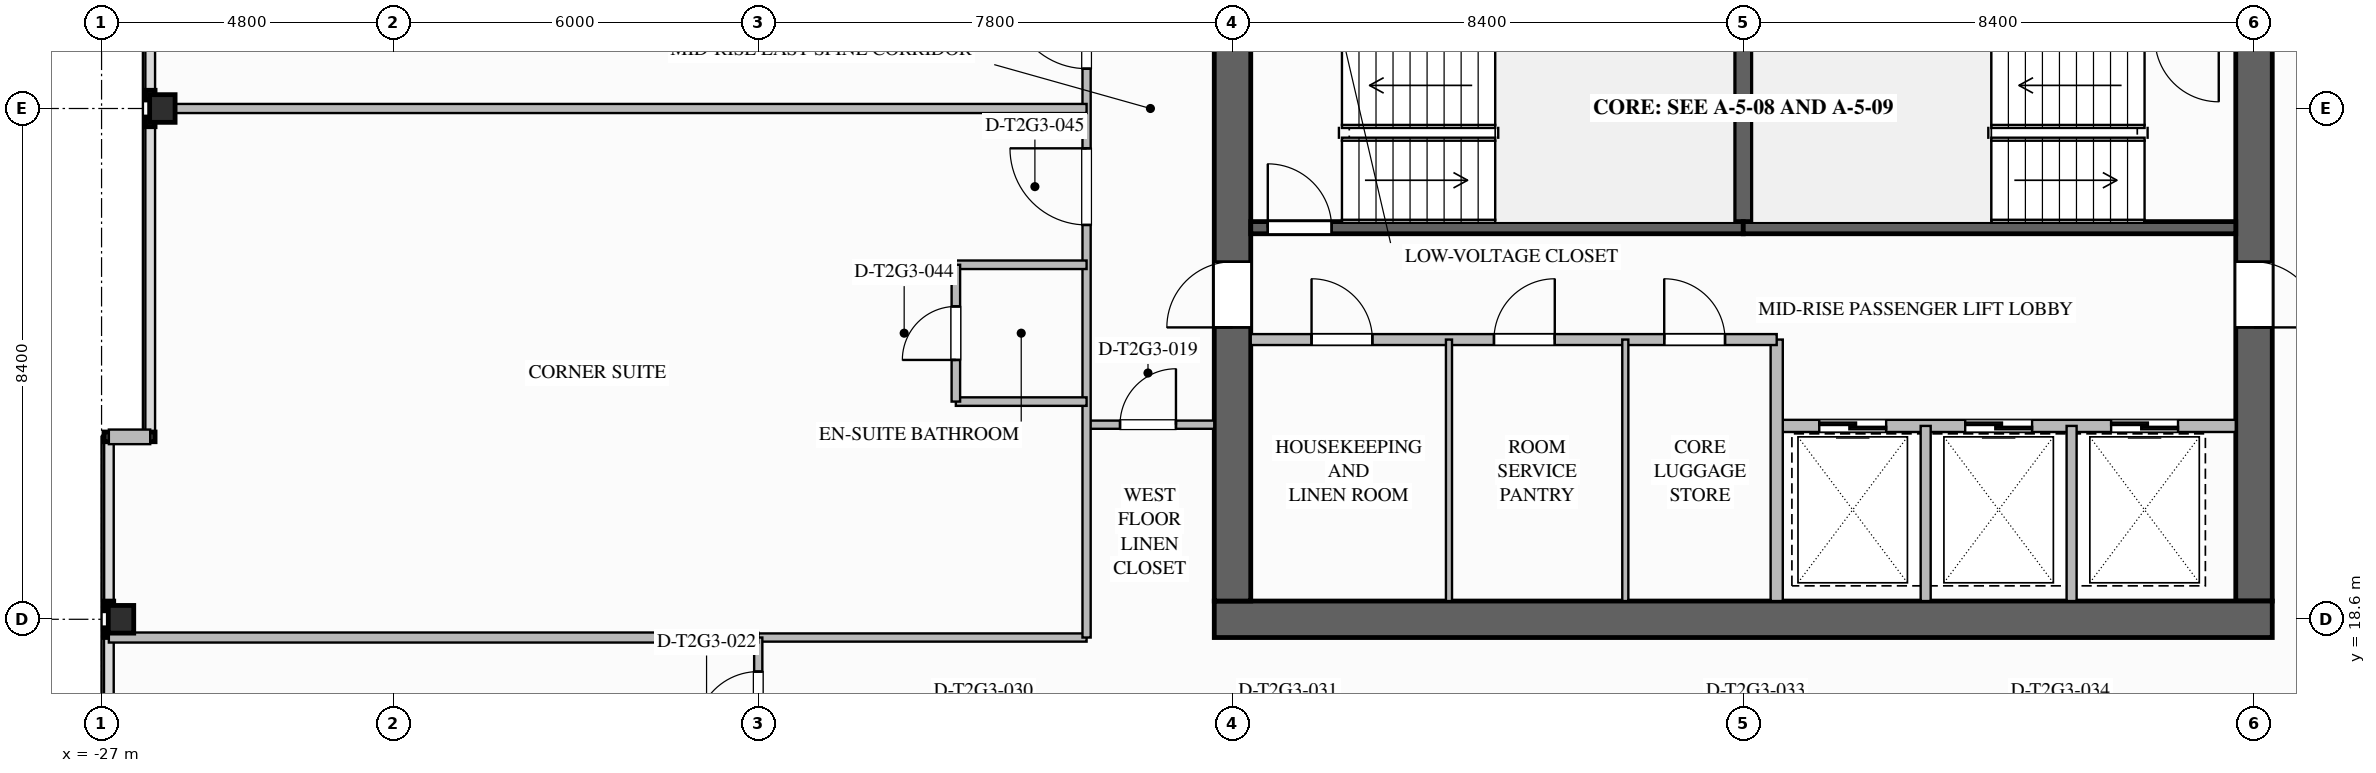
"""IFC4 building model, lengths in metres.
Left out: names, types, materials, properties, quantities, classifications, styles, units other than length and angle.
Written with IfcOpenShell. Run it as: python <this file> out.ifc"""

import sys

from ifc_helpers import new_model, si_unit, direction, frame, frame_2d, origin, origin_2d, place, context, subcontext, project, spatial, rectangle, i_section, extrude, element, fill, save


model = new_model("IFC4")
c1 = context("Model", 3, precision=1e-05, world=origin(), true_north=direction((0.0, 1.0)))
c2 = subcontext(c1, "Body", "Model", "MODEL_VIEW")
j1 = project(units=[si_unit("LENGTHUNIT", "METRE"), si_unit("PLANEANGLEUNIT", "RADIAN")], contexts=[c1])
p1 = place(None, origin())
s1 = spatial("IfcSite", under=j1, at=p1, CompositionType="ELEMENT")
p2 = place(p1, origin())
s2 = spatial("IfcBuilding", under=s1, at=p2, CompositionType="ELEMENT")
p3 = place(p2, frame((0.0, 0.0, 112.8)))
s3 = spatial("IfcBuildingStorey", under=s2, at=p3, CompositionType="ELEMENT", Elevation=112.8)
p4 = place(p3, frame((8.4, 35.1, 0.0), z_axis=(0.0, 0.0, 1.0), x_axis=(0.0, -1.0, 0.0)))
e1 = element("IfcWall", 1, at=p4, inside=s3, PredefinedType="SHEAR", context=c2, shape_type="SweptSolid", body=[
    extrude(rectangle(XDim=16.2, YDim=0.6, at=frame_2d((8.1, 0.0))), origin(), (0.0, 0.0, 1.0), 3.5),
])
p5 = place(p4, frame((3.08, 0.0, 0.0)))
e2 = element("IfcOpeningElement", 2, at=p5, cuts=e1, PredefinedType="OPENING", context=c2, shape_type="SweptSolid", body=[
    extrude(rectangle(XDim=1.12, YDim=2.1, at=frame_2d((0.56, 1.05))), frame((0.0, 0.31, 0.0), z_axis=(0.0, -1.0, 0.0), x_axis=(1.0, 0.0, 0.0)), (0.0, 0.0, 1.0), 0.62),
])
p6 = place(p4, frame((10.62, 0.0, 0.0)))
e3 = element("IfcOpeningElement", 3, at=p6, cuts=e1, PredefinedType="OPENING", context=c2, shape_type="SweptSolid", body=[
    extrude(rectangle(XDim=1.08, YDim=2.04, at=frame_2d((0.54, 1.02))), frame((0.0, 0.31, 0.0), z_axis=(0.0, -1.0, 0.0), x_axis=(1.0, 0.0, 0.0)), (0.0, 0.0, 1.0), 0.62),
])
p7 = place(p3, frame((8.7, 18.6, 0.0), z_axis=(0.0, 0.0, 1.0), x_axis=(-1.0, 0.0, 0.0)))
e4 = element("IfcWall", 4, at=p7, inside=s3, PredefinedType="SHEAR", context=c2, shape_type="SweptSolid", body=[
    extrude(rectangle(XDim=17.4, YDim=0.6, at=frame_2d((8.7, 0.0))), origin(), (0.0, 0.0, 1.0), 3.5),
])
p8 = place(p3, frame((-8.4, 18.9, 0.0), z_axis=(0.0, 0.0, 1.0), x_axis=(0.0, 1.0, 0.0)))
e5 = element("IfcWall", 5, at=p8, inside=s3, PredefinedType="SHEAR", context=c2, shape_type="SweptSolid", body=[
    extrude(rectangle(XDim=16.2, YDim=0.6, at=frame_2d((8.1, 0.0))), origin(), (0.0, 0.0, 1.0), 3.5),
])
p9 = place(p8, frame((4.5, 0.0, 0.0)))
e6 = element("IfcOpeningElement", 6, at=p9, cuts=e5, PredefinedType="OPENING", context=c2, shape_type="SweptSolid", body=[
    extrude(rectangle(XDim=1.08, YDim=2.04, at=frame_2d((0.54, 1.02))), frame((0.0, 0.31, 0.0), z_axis=(0.0, -1.0, 0.0), x_axis=(1.0, 0.0, 0.0)), (0.0, 0.0, 1.0), 0.62),
])
for number, where, z_axis, x_axis in (
    (7, (-26.68, 18.6, 0.0), (0.0, 0.0, 1.0), (1.0, 0.0, 0.0)),
    (8, (-26.0, 27.0, 0.0), (0.0, 0.0, 1.0), (1.0, 0.0, 0.0)),
):
    element("IfcColumn", number, at=place(p3, frame(where, z_axis=z_axis, x_axis=x_axis)), inside=s3, PredefinedType="COLUMN", context=c2, shape_type="SweptSolid", body=[
        extrude(i_section(OverallWidth=0.418, OverallDepth=0.455, WebThickness=0.042, FlangeThickness=0.068, FilletRadius=0.03, at=origin_2d()), origin(), (0.0, 0.0, 1.0), 3.497),
    ])
p10 = place(p3, frame((-26.88, 21.6, 0.0), z_axis=(0.0, 0.0, 1.0), x_axis=(1.0, 0.0, 0.0)))
e9 = element("IfcWall", 9, at=p10, inside=s3, PredefinedType="STANDARD", context=c2, shape_type="SweptSolid", body=[
    extrude(rectangle(XDim=0.68, YDim=0.24, at=frame_2d((0.34, 0.0))), origin(), (0.0, 0.0, 1.0), 3.24),
])
p11 = place(p3, frame((0.0, 25.04, 0.0), z_axis=(0.0, 0.0, 1.0), x_axis=(0.0, 1.0, 0.0)))
e10 = element("IfcWall", 10, at=p11, inside=s3, PredefinedType="SOLIDWALL", context=c2, shape_type="SweptSolid", body=[
    extrude(rectangle(XDim=3.12, YDim=0.3, at=frame_2d((1.56, 0.0))), origin(), (0.0, 0.0, 1.0), 3.24),
])
p12 = place(p3, frame((-8.1, 25.04, 0.0), z_axis=(0.0, 0.0, 1.0), x_axis=(1.0, 0.0, 0.0)))
e11 = element("IfcWall", 11, at=p12, inside=s3, PredefinedType="SOLIDWALL", context=c2, shape_type="SweptSolid", body=[
    extrude(rectangle(XDim=8.1, YDim=0.2, at=frame_2d((4.05, 0.0))), origin(), (0.0, 0.0, 1.0), 3.24),
])
p13 = place(p12, frame((0.28, 0.0, 0.0)))
e12 = element("IfcOpeningElement", 12, at=p13, cuts=e11, PredefinedType="OPENING", context=c2, shape_type="SweptSolid", body=[
    extrude(rectangle(XDim=1.05, YDim=2.1, at=frame_2d((0.525, 1.05))), frame((0.0, 0.11, 0.0), z_axis=(0.0, -1.0, 0.0), x_axis=(1.0, 0.0, 0.0)), (0.0, 0.0, 1.0), 0.22),
])
p14 = place(p3, frame((0.0, 25.04, 0.0), z_axis=(0.0, 0.0, 1.0), x_axis=(1.0, 0.0, 0.0)))
e13 = element("IfcWall", 13, at=p14, inside=s3, PredefinedType="SOLIDWALL", context=c2, shape_type="SweptSolid", body=[
    extrude(rectangle(XDim=8.1, YDim=0.2, at=frame_2d((4.05, 0.0))), origin(), (0.0, 0.0, 1.0), 3.24),
])
p15 = place(p3, frame((8.1, 21.78, 0.0), z_axis=(0.0, 0.0, 1.0), x_axis=(-1.0, 0.0, 0.0)))
e14 = element("IfcWall", 14, at=p15, inside=s3, PredefinedType="SOLIDWALL", context=c2, shape_type="SweptSolid", body=[
    extrude(rectangle(XDim=7.55, YDim=0.2, at=frame_2d((3.775, 0.0))), origin(), (0.0, 0.0, 1.0), 3.24),
])
p16 = place(p15, frame((5.75, 0.0, 0.0)))
e15 = element("IfcOpeningElement", 15, at=p16, cuts=e14, PredefinedType="OPENING", context=c2, shape_type="SweptSolid", body=[
    extrude(rectangle(XDim=1.1, YDim=2.2, at=frame_2d((0.55, 1.1))), frame((0.0, 0.11, 0.0), z_axis=(0.0, -1.0, 0.0), x_axis=(1.0, 0.0, 0.0)), (0.0, 0.0, 1.0), 0.22),
])
p17 = place(p15, frame((3.35, 0.0, 0.0)))
e16 = element("IfcOpeningElement", 16, at=p17, cuts=e14, PredefinedType="OPENING", context=c2, shape_type="SweptSolid", body=[
    extrude(rectangle(XDim=1.1, YDim=2.2, at=frame_2d((0.55, 1.1))), frame((0.0, 0.11, 0.0), z_axis=(0.0, -1.0, 0.0), x_axis=(1.0, 0.0, 0.0)), (0.0, 0.0, 1.0), 0.22),
])
p18 = place(p15, frame((0.95, 0.0, 0.0)))
e17 = element("IfcOpeningElement", 17, at=p18, cuts=e14, PredefinedType="OPENING", context=c2, shape_type="SweptSolid", body=[
    extrude(rectangle(XDim=1.1, YDim=2.2, at=frame_2d((0.55, 1.1))), frame((0.0, 0.11, 0.0), z_axis=(0.0, -1.0, 0.0), x_axis=(1.0, 0.0, 0.0)), (0.0, 0.0, 1.0), 0.22),
])
p19 = place(p3, frame((0.55, 18.9, 0.0), z_axis=(0.0, 0.0, 1.0), x_axis=(0.0, 1.0, 0.0)))
e18 = element("IfcWall", 18, at=p19, inside=s3, PredefinedType="SOLIDWALL", context=c2, shape_type="SweptSolid", body=[
    extrude(rectangle(XDim=4.3, YDim=0.2, at=frame_2d((2.15, 0.0))), origin(), (0.0, 0.0, 1.0), 3.24),
])
for number, where, z_axis, x_axis in (
    (19, (3.0, 18.9, 0.0), (0.0, 0.0, 1.0), (0.0, 1.0, 0.0)),
    (20, (5.4, 18.9, 0.0), (0.0, 0.0, 1.0), (0.0, 1.0, 0.0)),
):
    element("IfcWall", number, at=place(p3, frame(where, z_axis=z_axis, x_axis=x_axis)), inside=s3, PredefinedType="PARTITIONING", context=c2, shape_type="SweptSolid", body=[
        extrude(rectangle(XDim=2.88, YDim=0.165, at=frame_2d((1.44, 0.0))), origin(), (0.0, 0.0, 1.0), 3.24),
    ])
p20 = place(p3, frame((-8.1, 23.2, 0.0), z_axis=(0.0, 0.0, 1.0), x_axis=(1.0, 0.0, 0.0)))
e21 = element("IfcWall", 21, at=p20, inside=s3, PredefinedType="SOLIDWALL", context=c2, shape_type="SweptSolid", body=[
    extrude(rectangle(XDim=8.65, YDim=0.18, at=frame_2d((4.325, 0.0))), origin(), (0.0, 0.0, 1.0), 3.24),
])
p21 = place(p20, frame((1.0, 0.0, 0.0)))
e22 = element("IfcOpeningElement", 22, at=p21, cuts=e21, PredefinedType="OPENING", context=c2, shape_type="SweptSolid", body=[
    extrude(rectangle(XDim=1.0, YDim=2.1, at=frame_2d((0.5, 1.05))), frame((0.0, 0.1, 0.0), z_axis=(0.0, -1.0, 0.0), x_axis=(1.0, 0.0, 0.0)), (0.0, 0.0, 1.0), 0.2),
])
p22 = place(p20, frame((4.0, 0.0, 0.0)))
e23 = element("IfcOpeningElement", 23, at=p22, cuts=e21, PredefinedType="OPENING", context=c2, shape_type="SweptSolid", body=[
    extrude(rectangle(XDim=1.0, YDim=2.1, at=frame_2d((0.5, 1.05))), frame((0.0, 0.1, 0.0), z_axis=(0.0, -1.0, 0.0), x_axis=(1.0, 0.0, 0.0)), (0.0, 0.0, 1.0), 0.2),
])
p23 = place(p20, frame((6.8, 0.0, 0.0)))
e24 = element("IfcOpeningElement", 24, at=p23, cuts=e21, PredefinedType="OPENING", context=c2, shape_type="SweptSolid", body=[
    extrude(rectangle(XDim=1.0, YDim=2.1, at=frame_2d((0.5, 1.05))), frame((0.0, 0.1, 0.0), z_axis=(0.0, -1.0, 0.0), x_axis=(1.0, 0.0, 0.0)), (0.0, 0.0, 1.0), 0.2),
])
for number, where, z_axis, x_axis in (
    (25, (-4.84, 18.9, 0.0), (0.0, 0.0, 1.0), (0.0, 1.0, 0.0)),
    (26, (-1.94, 18.9, 0.0), (0.0, 0.0, 1.0), (0.0, 1.0, 0.0)),
):
    element("IfcWall", number, at=place(p3, frame(where, z_axis=z_axis, x_axis=x_axis)), inside=s3, PredefinedType="PARTITIONING", context=c2, shape_type="SweptSolid", body=[
        extrude(rectangle(XDim=4.3, YDim=0.1, at=frame_2d((2.15, 0.0))), origin(), (0.0, 0.0, 1.0), 3.24),
    ])
p24 = place(p3, frame((-10.8, 21.8, 0.0), z_axis=(0.0, 0.0, 1.0), x_axis=(1.0, 0.0, 0.0)))
e27 = element("IfcWall", 27, at=p24, inside=s3, PredefinedType="PARTITIONING", context=c2, shape_type="SweptSolid", body=[
    extrude(rectangle(XDim=2.1, YDim=0.135, at=frame_2d((1.05, 0.0))), origin(), (0.0, 0.0, 1.0), 3.24),
])
p25 = place(p24, frame((0.55, 0.0, 0.0)))
e28 = element("IfcOpeningElement", 28, at=p25, cuts=e27, PredefinedType="OPENING", context=c2, shape_type="SweptSolid", body=[
    extrude(rectangle(XDim=0.92, YDim=2.1, at=frame_2d((0.46, 1.05))), frame((0.0, 0.077, 0.0), z_axis=(0.0, -1.0, 0.0), x_axis=(1.0, 0.0, 0.0)), (0.0, 0.0, 1.0), 0.155),
])
p26 = place(p3, frame((-16.2, 18.3, 0.0), z_axis=(0.0, 0.0, 1.0), x_axis=(1.0, 0.0, 0.0)))
e29 = element("IfcWall", 29, at=p26, inside=s3, PredefinedType="PARTITIONING", context=c2, shape_type="SweptSolid", body=[
    extrude(rectangle(XDim=5.4, YDim=0.135, at=frame_2d((2.7, 0.0))), origin(), (0.0, 0.0, 1.0), 3.24),
])
p27 = place(p3, frame((-10.8, 18.3, 0.0), z_axis=(0.0, 0.0, 1.0), x_axis=(0.0, 1.0, 0.0)))
e30 = element("IfcWall", 30, at=p27, inside=s3, PredefinedType="PARTITIONING", context=c2, shape_type="SweptSolid", body=[
    extrude(rectangle(XDim=17.4, YDim=0.135, at=frame_2d((8.7, 0.0))), origin(), (0.0, 0.0, 1.0), 3.24),
])
p28 = place(p27, frame((6.785, 0.0, 0.0)))
e31 = element("IfcOpeningElement", 31, at=p28, cuts=e30, PredefinedType="OPENING", context=c2, shape_type="SweptSolid", body=[
    extrude(rectangle(XDim=1.26, YDim=2.2, at=frame_2d((0.63, 1.1))), frame((0.0, 0.077, 0.0), z_axis=(0.0, -1.0, 0.0), x_axis=(1.0, 0.0, 0.0)), (0.0, 0.0, 1.0), 0.155),
])
p29 = place(p27, frame((9.355, 0.0, 0.0)))
e32 = element("IfcOpeningElement", 32, at=p29, cuts=e30, PredefinedType="OPENING", context=c2, shape_type="SweptSolid", body=[
    extrude(rectangle(XDim=1.26, YDim=2.2, at=frame_2d((0.63, 1.1))), frame((0.0, 0.077, 0.0), z_axis=(0.0, -1.0, 0.0), x_axis=(1.0, 0.0, 0.0)), (0.0, 0.0, 1.0), 0.155),
])
p30 = place(p3, frame((-16.2, 16.2, 0.0), z_axis=(0.0, 0.0, 1.0), x_axis=(0.0, 1.0, 0.0)))
e33 = element("IfcWall", 33, at=p30, inside=s3, PredefinedType="PARTITIONING", context=c2, shape_type="SweptSolid", body=[
    extrude(rectangle(XDim=2.1, YDim=0.135, at=frame_2d((1.05, 0.0))), origin(), (0.0, 0.0, 1.0), 2.452),
])
p31 = place(p30, frame((0.52, 0.0, 0.0)))
e34 = element("IfcOpeningElement", 34, at=p31, cuts=e33, PredefinedType="OPENING", context=c2, shape_type="SweptSolid", body=[
    extrude(rectangle(XDim=1.02, YDim=2.15, at=frame_2d((0.51, 1.075))), frame((0.0, 0.077, 0.0), z_axis=(0.0, -1.0, 0.0), x_axis=(1.0, 0.0, 0.0)), (0.0, 0.0, 1.0), 0.155),
])
p32 = place(p3, frame((-26.88, 18.3, 0.0), z_axis=(0.0, 0.0, 1.0), x_axis=(1.0, 0.0, 0.0)))
e35 = element("IfcWall", 35, at=p32, inside=s3, PredefinedType="PARTITIONING", context=c2, shape_type="SweptSolid", body=[
    extrude(rectangle(XDim=10.68, YDim=0.165, at=frame_2d((5.34, 0.0))), origin(), (0.0, 0.0, 1.0), 2.452),
])
p33 = place(p3, frame((-26.2, 27.0, 0.0), z_axis=(0.0, 0.0, 1.0), x_axis=(1.0, 0.0, 0.0)))
e36 = element("IfcWall", 36, at=p33, inside=s3, PredefinedType="PARTITIONING", context=c2, shape_type="SweptSolid", body=[
    extrude(rectangle(XDim=15.4, YDim=0.15, at=frame_2d((7.7, 0.0))), origin(), (0.0, 0.0, 1.0), 2.452),
])
for number, where, z_axis, x_axis in (
    (37, (-10.8, 22.18, 0.0), (0.0, 0.0, 1.0), (-1.0, 0.0, 0.0)),
    (38, (-10.8, 24.43, 0.0), (0.0, 0.0, 1.0), (-1.0, 0.0, 0.0)),
):
    element("IfcWall", number, at=place(p3, frame(where, z_axis=z_axis, x_axis=x_axis)), inside=s3, PredefinedType="PLUMBINGWALL", context=c2, shape_type="SweptSolid", body=[
        extrude(rectangle(XDim=2.15, YDim=0.14, at=frame_2d((1.075, 0.0))), origin(), (0.0, 0.0, 1.0), 3.24),
    ])
p34 = place(p3, frame((-12.95, 22.18, 0.0), z_axis=(0.0, 0.0, 1.0), x_axis=(0.0, 1.0, 0.0)))
e39 = element("IfcWall", 39, at=p34, inside=s3, PredefinedType="PLUMBINGWALL", context=c2, shape_type="SweptSolid", body=[
    extrude(rectangle(XDim=2.25, YDim=0.14, at=frame_2d((1.125, 0.0))), origin(), (0.0, 0.0, 1.0), 3.24),
])
p35 = place(p34, frame((0.685, 0.0, 0.0)))
e40 = element("IfcOpeningElement", 40, at=p35, cuts=e39, PredefinedType="OPENING", context=c2, shape_type="SweptSolid", body=[
    extrude(rectangle(XDim=0.88, YDim=2.1, at=frame_2d((0.44, 1.05))), frame((0.0, 0.08, 0.0), z_axis=(0.0, -1.0, 0.0), x_axis=(1.0, 0.0, 0.0)), (0.0, 0.0, 1.0), 0.16),
])
p36 = place(p13, origin())
e41 = element("IfcDoor", 41, at=p36, inside=s3, OperationType="SINGLE_SWING_LEFT", PredefinedType="DOOR", context=c2, shape_type="SweptSolid", body=[
    extrude(rectangle(XDim=1.05, YDim=2.1, at=frame_2d((0.525, 1.05))), frame((0.0, 0.025, 0.0), z_axis=(0.0, -1.0, 0.0), x_axis=(1.0, 0.0, 0.0)), (0.0, 0.0, 1.0), 0.05),
])
fill(e12, e41)
p37 = place(p16, origin())
e42 = element("IfcDoor", 42, at=p37, inside=s3, OperationType="SLIDING_TO_LEFT", PredefinedType="DOOR", context=c2, shape_type="SweptSolid", body=[
    extrude(rectangle(XDim=1.1, YDim=2.2, at=frame_2d((0.55, 1.1))), frame((0.0, 0.025, 0.0), z_axis=(0.0, -1.0, 0.0), x_axis=(1.0, 0.0, 0.0)), (0.0, 0.0, 1.0), 0.05),
])
fill(e15, e42)
p38 = place(p17, origin())
e43 = element("IfcDoor", 43, at=p38, inside=s3, OperationType="SLIDING_TO_LEFT", PredefinedType="DOOR", context=c2, shape_type="SweptSolid", body=[
    extrude(rectangle(XDim=1.1, YDim=2.2, at=frame_2d((0.55, 1.1))), frame((0.0, 0.025, 0.0), z_axis=(0.0, -1.0, 0.0), x_axis=(1.0, 0.0, 0.0)), (0.0, 0.0, 1.0), 0.05),
])
fill(e16, e43)
p39 = place(p18, origin())
e44 = element("IfcDoor", 44, at=p39, inside=s3, OperationType="SLIDING_TO_LEFT", PredefinedType="DOOR", context=c2, shape_type="SweptSolid", body=[
    extrude(rectangle(XDim=1.1, YDim=2.2, at=frame_2d((0.55, 1.1))), frame((0.0, 0.025, 0.0), z_axis=(0.0, -1.0, 0.0), x_axis=(1.0, 0.0, 0.0)), (0.0, 0.0, 1.0), 0.05),
])
fill(e17, e44)
p40 = place(p9, origin())
e45 = element("IfcDoor", 45, at=p40, inside=s3, OperationType="SINGLE_SWING_LEFT", PredefinedType="DOOR", context=c2, shape_type="SweptSolid", body=[
    extrude(rectangle(XDim=1.08, YDim=2.04, at=frame_2d((0.54, 1.02))), frame((0.0, 0.025, 0.0), z_axis=(0.0, -1.0, 0.0), x_axis=(1.0, 0.0, 0.0)), (0.0, 0.0, 1.0), 0.05),
])
fill(e6, e45)
p41 = place(p6, origin())
e46 = element("IfcDoor", 46, at=p41, inside=s3, OperationType="SINGLE_SWING_RIGHT", PredefinedType="DOOR", context=c2, shape_type="SweptSolid", body=[
    extrude(rectangle(XDim=1.08, YDim=2.04, at=frame_2d((0.54, 1.02))), frame((0.0, 0.025, 0.0), z_axis=(0.0, -1.0, 0.0), x_axis=(1.0, 0.0, 0.0)), (0.0, 0.0, 1.0), 0.05),
])
fill(e3, e46)
p42 = place(p21, origin())
e47 = element("IfcDoor", 47, at=p42, inside=s3, OperationType="SINGLE_SWING_LEFT", PredefinedType="DOOR", context=c2, shape_type="SweptSolid", body=[
    extrude(rectangle(XDim=1.0, YDim=2.1, at=frame_2d((0.5, 1.05))), frame((0.0, 0.025, 0.0), z_axis=(0.0, -1.0, 0.0), x_axis=(1.0, 0.0, 0.0)), (0.0, 0.0, 1.0), 0.05),
])
fill(e22, e47)
p43 = place(p22, origin())
e48 = element("IfcDoor", 48, at=p43, inside=s3, OperationType="SINGLE_SWING_RIGHT", PredefinedType="DOOR", context=c2, shape_type="SweptSolid", body=[
    extrude(rectangle(XDim=1.0, YDim=2.1, at=frame_2d((0.5, 1.05))), frame((0.0, 0.025, 0.0), z_axis=(0.0, -1.0, 0.0), x_axis=(1.0, 0.0, 0.0)), (0.0, 0.0, 1.0), 0.05),
])
fill(e23, e48)
p44 = place(p23, origin())
e49 = element("IfcDoor", 49, at=p44, inside=s3, OperationType="SINGLE_SWING_LEFT", PredefinedType="DOOR", context=c2, shape_type="SweptSolid", body=[
    extrude(rectangle(XDim=1.0, YDim=2.1, at=frame_2d((0.5, 1.05))), frame((0.0, 0.025, 0.0), z_axis=(0.0, -1.0, 0.0), x_axis=(1.0, 0.0, 0.0)), (0.0, 0.0, 1.0), 0.05),
])
fill(e24, e49)
p45 = place(p25, origin())
e50 = element("IfcDoor", 50, at=p45, inside=s3, OperationType="SINGLE_SWING_RIGHT", PredefinedType="DOOR", context=c2, shape_type="SweptSolid", body=[
    extrude(rectangle(XDim=0.92, YDim=2.1, at=frame_2d((0.46, 1.05))), frame((0.0, 0.025, 0.0), z_axis=(0.0, -1.0, 0.0), x_axis=(1.0, 0.0, 0.0)), (0.0, 0.0, 1.0), 0.05),
])
fill(e28, e50)
p46 = place(p31, origin())
e51 = element("IfcDoor", 51, at=p46, inside=s3, OperationType="SINGLE_SWING_LEFT", PredefinedType="DOOR", context=c2, shape_type="SweptSolid", body=[
    extrude(rectangle(XDim=1.02, YDim=2.15, at=frame_2d((0.51, 1.075))), frame((0.0, 0.025, 0.0), z_axis=(0.0, -1.0, 0.0), x_axis=(1.0, 0.0, 0.0)), (0.0, 0.0, 1.0), 0.05),
])
fill(e34, e51)
p47 = place(p35, origin())
e52 = element("IfcDoor", 52, at=p47, inside=s3, OperationType="SINGLE_SWING_LEFT", PredefinedType="DOOR", context=c2, shape_type="SweptSolid", body=[
    extrude(rectangle(XDim=0.88, YDim=2.1, at=frame_2d((0.44, 1.05))), frame((0.0, 0.025, 0.0), z_axis=(0.0, -1.0, 0.0), x_axis=(1.0, 0.0, 0.0)), (0.0, 0.0, 1.0), 0.05),
])
fill(e40, e52)
p48 = place(p28, origin())
e53 = element("IfcDoor", 53, at=p48, inside=s3, OperationType="SINGLE_SWING_RIGHT", PredefinedType="DOOR", context=c2, shape_type="SweptSolid", body=[
    extrude(rectangle(XDim=1.26, YDim=2.2, at=frame_2d((0.63, 1.1))), frame((0.0, 0.025, 0.0), z_axis=(0.0, -1.0, 0.0), x_axis=(1.0, 0.0, 0.0)), (0.0, 0.0, 1.0), 0.05),
])
fill(e31, e53)
p49 = place(p29, origin())
e54 = element("IfcDoor", 54, at=p49, inside=s3, OperationType="SINGLE_SWING_RIGHT", PredefinedType="DOOR", context=c2, shape_type="SweptSolid", body=[
    extrude(rectangle(XDim=1.26, YDim=2.2, at=frame_2d((0.63, 1.1))), frame((0.0, 0.025, 0.0), z_axis=(0.0, -1.0, 0.0), x_axis=(1.0, 0.0, 0.0)), (0.0, 0.0, 1.0), 0.05),
])
fill(e32, e54)
save(model, sys.argv[1])
